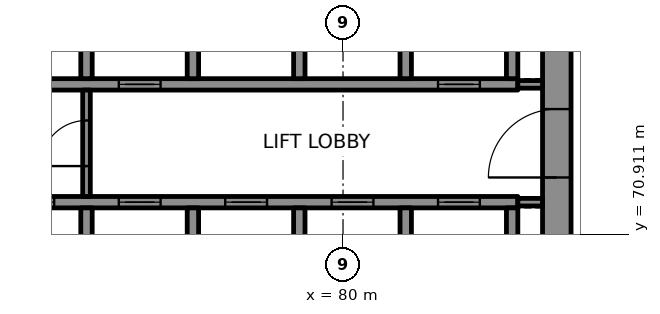
"""IFC4 building model, lengths in metres.
Left out: names, types, materials, properties, quantities, classifications, styles, units other than length and angle.
Written with IfcOpenShell. Run it as: python <this file> out.ifc"""

import sys

from ifc_helpers import new_model, si_unit, direction, frame, frame_2d, origin, place, context, subcontext, project, spatial, rectangle, extrude, element, fill, save


model = new_model("IFC4")
c1 = context("Model", 3, precision=1e-05, world=origin(), true_north=direction((0.0, 1.0)))
c2 = subcontext(c1, "Body", "Model", "MODEL_VIEW")
j1 = project(units=[si_unit("LENGTHUNIT", "METRE"), si_unit("PLANEANGLEUNIT", "RADIAN")], contexts=[c1])
p1 = place(None, origin())
s1 = spatial("IfcSite", under=j1, at=p1, CompositionType="ELEMENT")
p2 = place(p1, origin())
s2 = spatial("IfcBuilding", under=s1, at=p2, CompositionType="ELEMENT")
p3 = place(p2, frame((0.0, 0.0, 218.2)))
s3 = spatial("IfcBuildingStorey", under=s2, at=p3, CompositionType="ELEMENT", Elevation=218.2)
p4 = place(p3, frame((85.625, 67.75, 0.0), z_axis=(0.0, 0.0, 1.0), x_axis=(0.0, 1.0, 0.0)))
e1 = element("IfcWall", 1, at=p4, inside=s3, PredefinedType="SHEAR", context=c2, shape_type="SweptSolid", body=[
    extrude(rectangle(XDim=14.5, YDim=0.75, at=frame_2d((7.25, 0.0))), origin(), (0.0, 0.0, 1.0), 3.7),
])
p5 = place(p4, frame((4.65, 0.0, 0.0)))
e2 = element("IfcOpeningElement", 2, at=p5, cuts=e1, PredefinedType="OPENING", context=c2, shape_type="SweptSolid", body=[
    extrude(rectangle(XDim=1.8, YDim=2.1, at=frame_2d((0.9, 1.05))), frame((0.0, 0.385, 0.0), z_axis=(0.0, -1.0, 0.0), x_axis=(1.0, 0.0, 0.0)), (0.0, 0.0, 1.0), 0.77),
])
p6 = place(p4, frame((11.8, 0.0, 0.0)))
e3 = element("IfcOpeningElement", 3, at=p6, cuts=e1, PredefinedType="OPENING", context=c2, shape_type="SweptSolid", body=[
    extrude(rectangle(XDim=0.9, YDim=2.1, at=frame_2d((0.45, 1.05))), frame((0.0, 0.385, 0.0), z_axis=(0.0, -1.0, 0.0), x_axis=(1.0, 0.0, 0.0)), (0.0, 0.0, 1.0), 0.77),
])
p7 = place(p3, frame((70.3, 71.75, 0.0), z_axis=(0.0, 0.0, 1.0), x_axis=(1.0, 0.0, 0.0)))
e4 = element("IfcWall", 4, at=p7, inside=s3, PredefinedType="SHEAR", context=c2, shape_type="SweptSolid", body=[
    extrude(rectangle(XDim=14.3, YDim=0.3, at=frame_2d((7.15, 0.0))), origin(), (0.0, 0.0, 1.0), 3.7),
])
p8 = place(p7, frame((1.0, 0.0, 0.0)))
e5 = element("IfcOpeningElement", 5, at=p8, cuts=e4, PredefinedType="OPENING", context=c2, shape_type="SweptSolid", body=[
    extrude(rectangle(XDim=1.1, YDim=2.1, at=frame_2d((0.55, 1.05))), frame((0.0, 0.16, 0.0), z_axis=(0.0, -1.0, 0.0), x_axis=(1.0, 0.0, 0.0)), (0.0, 0.0, 1.0), 0.32),
])
p9 = place(p7, frame((3.8, 0.0, 0.0)))
e6 = element("IfcOpeningElement", 6, at=p9, cuts=e4, PredefinedType="OPENING", context=c2, shape_type="SweptSolid", body=[
    extrude(rectangle(XDim=1.1, YDim=2.1, at=frame_2d((0.55, 1.05))), frame((0.0, 0.16, 0.0), z_axis=(0.0, -1.0, 0.0), x_axis=(1.0, 0.0, 0.0)), (0.0, 0.0, 1.0), 0.32),
])
p10 = place(p7, frame((6.6, 0.0, 0.0)))
e7 = element("IfcOpeningElement", 7, at=p10, cuts=e4, PredefinedType="OPENING", context=c2, shape_type="SweptSolid", body=[
    extrude(rectangle(XDim=1.1, YDim=2.1, at=frame_2d((0.55, 1.05))), frame((0.0, 0.16, 0.0), z_axis=(0.0, -1.0, 0.0), x_axis=(1.0, 0.0, 0.0)), (0.0, 0.0, 1.0), 0.32),
])
p11 = place(p7, frame((9.4, 0.0, 0.0)))
e8 = element("IfcOpeningElement", 8, at=p11, cuts=e4, PredefinedType="OPENING", context=c2, shape_type="SweptSolid", body=[
    extrude(rectangle(XDim=1.1, YDim=2.1, at=frame_2d((0.55, 1.05))), frame((0.0, 0.16, 0.0), z_axis=(0.0, -1.0, 0.0), x_axis=(1.0, 0.0, 0.0)), (0.0, 0.0, 1.0), 0.32),
])
p12 = place(p7, frame((12.2, 0.0, 0.0)))
e9 = element("IfcOpeningElement", 9, at=p12, cuts=e4, PredefinedType="OPENING", context=c2, shape_type="SweptSolid", body=[
    extrude(rectangle(XDim=1.1, YDim=2.1, at=frame_2d((0.55, 1.05))), frame((0.0, 0.16, 0.0), z_axis=(0.0, -1.0, 0.0), x_axis=(1.0, 0.0, 0.0)), (0.0, 0.0, 1.0), 0.32),
])
p13 = place(p3, frame((70.3, 74.85, 0.0), z_axis=(0.0, 0.0, 1.0), x_axis=(1.0, 0.0, 0.0)))
e10 = element("IfcWall", 10, at=p13, inside=s3, PredefinedType="SHEAR", context=c2, shape_type="SweptSolid", body=[
    extrude(rectangle(XDim=14.3, YDim=0.3, at=frame_2d((7.15, 0.0))), origin(), (0.0, 0.0, 1.0), 3.7),
])
p14 = place(p13, frame((3.8, 0.0, 0.0)))
e11 = element("IfcOpeningElement", 11, at=p14, cuts=e10, PredefinedType="OPENING", context=c2, shape_type="SweptSolid", body=[
    extrude(rectangle(XDim=1.1, YDim=2.1, at=frame_2d((0.55, 1.05))), frame((0.0, 0.16, 0.0), z_axis=(0.0, -1.0, 0.0), x_axis=(1.0, 0.0, 0.0)), (0.0, 0.0, 1.0), 0.32),
])
p15 = place(p13, frame((12.2, 0.0, 0.0)))
e12 = element("IfcOpeningElement", 12, at=p15, cuts=e10, PredefinedType="OPENING", context=c2, shape_type="SweptSolid", body=[
    extrude(rectangle(XDim=1.1, YDim=2.1, at=frame_2d((0.55, 1.05))), frame((0.0, 0.16, 0.0), z_axis=(0.0, -1.0, 0.0), x_axis=(1.0, 0.0, 0.0)), (0.0, 0.0, 1.0), 0.32),
])
for number, where, z_axis, x_axis in (
    (13, (73.25, 69.0, 0.0), (0.0, 0.0, 1.0), (0.0, 1.0, 0.0)),
    (14, (73.25, 75.0, 0.0), (0.0, 0.0, 1.0), (0.0, 1.0, 0.0)),
    (15, (76.05, 69.0, 0.0), (0.0, 0.0, 1.0), (0.0, 1.0, 0.0)),
    (16, (76.05, 75.0, 0.0), (0.0, 0.0, 1.0), (0.0, 1.0, 0.0)),
    (17, (78.85, 69.0, 0.0), (0.0, 0.0, 1.0), (0.0, 1.0, 0.0)),
    (18, (78.85, 75.0, 0.0), (0.0, 0.0, 1.0), (0.0, 1.0, 0.0)),
    (19, (81.65, 69.0, 0.0), (0.0, 0.0, 1.0), (0.0, 1.0, 0.0)),
    (20, (81.65, 75.0, 0.0), (0.0, 0.0, 1.0), (0.0, 1.0, 0.0)),
    (21, (84.45, 69.0, 0.0), (0.0, 0.0, 1.0), (0.0, 1.0, 0.0)),
    (22, (84.45, 75.0, 0.0), (0.0, 0.0, 1.0), (0.0, 1.0, 0.0)),
):
    element("IfcWall", number, at=place(p3, frame(where, z_axis=z_axis, x_axis=x_axis)), inside=s3, PredefinedType="SHEAR", context=c2, shape_type="SweptSolid", body=[
        extrude(rectangle(XDim=2.6, YDim=0.3, at=frame_2d((1.3, 0.0))), origin(), (0.0, 0.0, 1.0), 3.7),
    ])
for number, where, z_axis, x_axis in (
    (23, (84.6, 71.75, 0.0), (0.0, 0.0, 1.0), (1.0, 0.0, 0.0)),
    (24, (84.6, 74.85, 0.0), (0.0, 0.0, 1.0), (1.0, 0.0, 0.0)),
):
    element("IfcWall", number, at=place(p3, frame(where, z_axis=z_axis, x_axis=x_axis)), inside=s3, PredefinedType="PARTITIONING", context=c2, shape_type="SweptSolid", body=[
        extrude(rectangle(XDim=0.65, YDim=0.2, at=frame_2d((0.325, 0.0))), origin(), (0.0, 0.0, 1.0), 3.7),
    ])
p16 = place(p3, frame((73.25, 71.9, 0.0), z_axis=(0.0, 0.0, 1.0), x_axis=(0.0, 1.0, 0.0)))
e25 = element("IfcWall", 25, at=p16, inside=s3, PredefinedType="PARTITIONING", context=c2, shape_type="SweptSolid", body=[
    extrude(rectangle(XDim=2.8, YDim=0.2, at=frame_2d((1.4, 0.0))), origin(), (0.0, 0.0, 1.0), 3.7),
])
p17 = place(p16, frame((0.8, 0.0, 0.0)))
e26 = element("IfcOpeningElement", 26, at=p17, cuts=e25, PredefinedType="OPENING", context=c2, shape_type="SweptSolid", body=[
    extrude(rectangle(XDim=1.2, YDim=2.1, at=frame_2d((0.6, 1.05))), frame((0.0, 0.11, 0.0), z_axis=(0.0, -1.0, 0.0), x_axis=(1.0, 0.0, 0.0)), (0.0, 0.0, 1.0), 0.22),
])
p18 = place(p8, origin())
e27 = element("IfcDoor", 27, at=p18, inside=s3, OperationType="DOUBLE_DOOR_SLIDING", PredefinedType="DOOR", context=c2, shape_type="SweptSolid", body=[
    extrude(rectangle(XDim=1.1, YDim=2.1, at=frame_2d((0.55, 1.05))), frame((0.0, 0.025, 0.0), z_axis=(0.0, -1.0, 0.0), x_axis=(1.0, 0.0, 0.0)), (0.0, 0.0, 1.0), 0.05),
])
fill(e5, e27)
p19 = place(p9, origin())
e28 = element("IfcDoor", 28, at=p19, inside=s3, OperationType="DOUBLE_DOOR_SLIDING", PredefinedType="DOOR", context=c2, shape_type="SweptSolid", body=[
    extrude(rectangle(XDim=1.1, YDim=2.1, at=frame_2d((0.55, 1.05))), frame((0.0, 0.025, 0.0), z_axis=(0.0, -1.0, 0.0), x_axis=(1.0, 0.0, 0.0)), (0.0, 0.0, 1.0), 0.05),
])
fill(e6, e28)
p20 = place(p10, origin())
e29 = element("IfcDoor", 29, at=p20, inside=s3, OperationType="DOUBLE_DOOR_SLIDING", PredefinedType="DOOR", context=c2, shape_type="SweptSolid", body=[
    extrude(rectangle(XDim=1.1, YDim=2.1, at=frame_2d((0.55, 1.05))), frame((0.0, 0.025, 0.0), z_axis=(0.0, -1.0, 0.0), x_axis=(1.0, 0.0, 0.0)), (0.0, 0.0, 1.0), 0.05),
])
fill(e7, e29)
p21 = place(p11, origin())
e30 = element("IfcDoor", 30, at=p21, inside=s3, OperationType="DOUBLE_DOOR_SLIDING", PredefinedType="DOOR", context=c2, shape_type="SweptSolid", body=[
    extrude(rectangle(XDim=1.1, YDim=2.1, at=frame_2d((0.55, 1.05))), frame((0.0, 0.025, 0.0), z_axis=(0.0, -1.0, 0.0), x_axis=(1.0, 0.0, 0.0)), (0.0, 0.0, 1.0), 0.05),
])
fill(e8, e30)
p22 = place(p12, origin())
e31 = element("IfcDoor", 31, at=p22, inside=s3, OperationType="DOUBLE_DOOR_SLIDING", PredefinedType="DOOR", context=c2, shape_type="SweptSolid", body=[
    extrude(rectangle(XDim=1.1, YDim=2.1, at=frame_2d((0.55, 1.05))), frame((0.0, 0.025, 0.0), z_axis=(0.0, -1.0, 0.0), x_axis=(1.0, 0.0, 0.0)), (0.0, 0.0, 1.0), 0.05),
])
fill(e9, e31)
p23 = place(p14, origin())
e32 = element("IfcDoor", 32, at=p23, inside=s3, OperationType="DOUBLE_DOOR_SLIDING", PredefinedType="DOOR", context=c2, shape_type="SweptSolid", body=[
    extrude(rectangle(XDim=1.1, YDim=2.1, at=frame_2d((0.55, 1.05))), frame((0.0, 0.025, 0.0), z_axis=(0.0, -1.0, 0.0), x_axis=(1.0, 0.0, 0.0)), (0.0, 0.0, 1.0), 0.05),
])
fill(e11, e32)
p24 = place(p15, origin())
e33 = element("IfcDoor", 33, at=p24, inside=s3, OperationType="DOUBLE_DOOR_SLIDING", PredefinedType="DOOR", context=c2, shape_type="SweptSolid", body=[
    extrude(rectangle(XDim=1.1, YDim=2.1, at=frame_2d((0.55, 1.05))), frame((0.0, 0.025, 0.0), z_axis=(0.0, -1.0, 0.0), x_axis=(1.0, 0.0, 0.0)), (0.0, 0.0, 1.0), 0.05),
])
fill(e12, e33)
p25 = place(p17, origin())
e34 = element("IfcDoor", 34, at=p25, inside=s3, OperationType="SINGLE_SWING_LEFT", PredefinedType="DOOR", context=c2, shape_type="SweptSolid", body=[
    extrude(rectangle(XDim=1.2, YDim=2.1, at=frame_2d((0.6, 1.05))), frame((0.0, 0.025, 0.0), z_axis=(0.0, -1.0, 0.0), x_axis=(1.0, 0.0, 0.0)), (0.0, 0.0, 1.0), 0.05),
])
fill(e26, e34)
p26 = place(p5, origin())
e35 = element("IfcDoor", 35, at=p26, inside=s3, OperationType="SINGLE_SWING_RIGHT", PredefinedType="DOOR", context=c2, shape_type="SweptSolid", body=[
    extrude(rectangle(XDim=1.8, YDim=2.1, at=frame_2d((0.9, 1.05))), frame((0.0, 0.095, 0.0), z_axis=(0.0, -1.0, 0.0), x_axis=(1.0, 0.0, 0.0)), (0.0, 0.0, 1.0), 0.19),
])
fill(e2, e35)
save(model, sys.argv[1])
